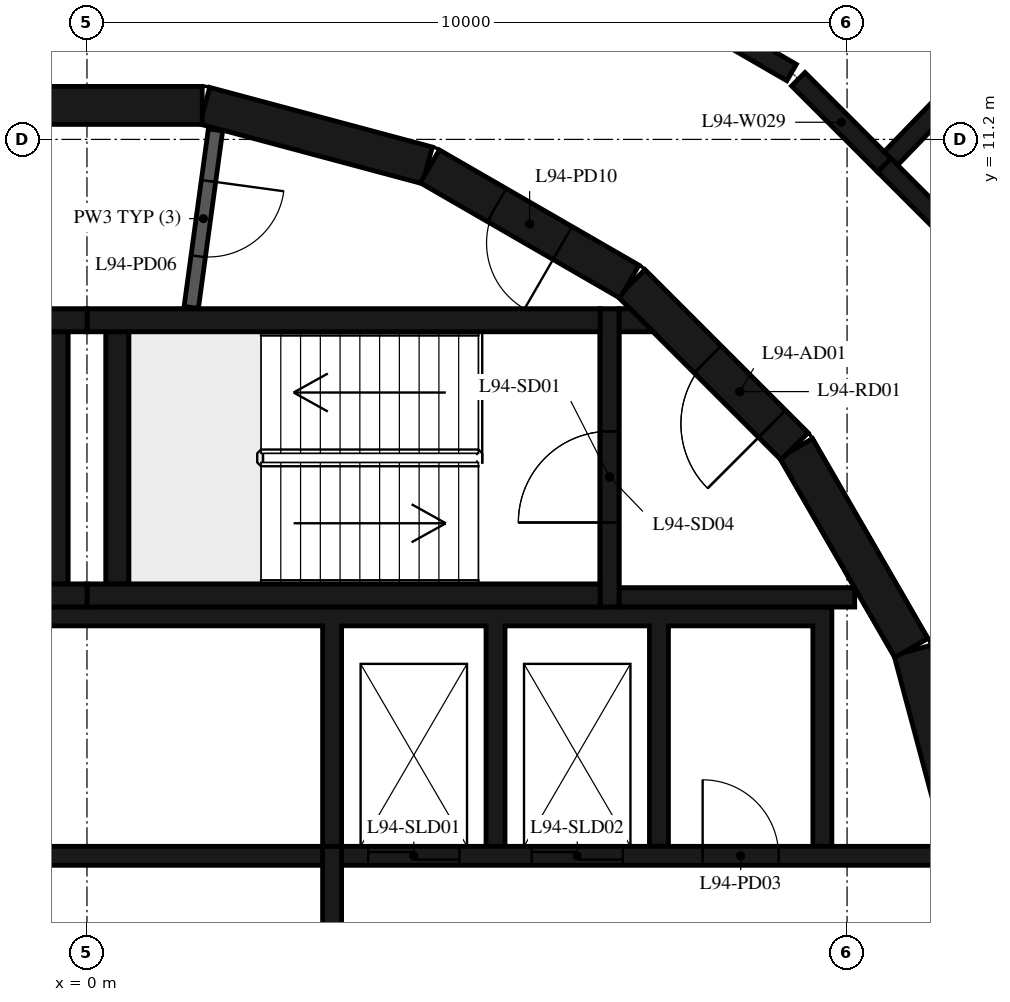
"""IFC4 building model, lengths in metres.
Left out: names, types, materials, properties, quantities, classifications, styles, units other than length and angle.
Written with IfcOpenShell. Run it as: python <this file> out.ifc"""

import sys

from ifc_helpers import new_model, si_unit, direction, frame, frame_2d, origin, place, context, subcontext, project, spatial, polyline, rectangle, outline, extrude, element, fill, save


model = new_model("IFC4")
c1 = context("Model", 3, precision=1e-05, world=origin(), true_north=direction((0.0, 1.0)))
c2 = subcontext(c1, "Body", "Model", "MODEL_VIEW")
j1 = project(units=[si_unit("LENGTHUNIT", "METRE"), si_unit("PLANEANGLEUNIT", "RADIAN")], contexts=[c1])
p1 = place(None, origin())
s1 = spatial("IfcSite", under=j1, at=p1, CompositionType="ELEMENT")
p2 = place(p1, origin())
s2 = spatial("IfcBuilding", under=s1, at=p2, CompositionType="ELEMENT")
p3 = place(p2, frame((0.0, 0.0, 366.2)))
s3 = spatial("IfcBuildingStorey", under=s2, at=p3, CompositionType="ELEMENT", Elevation=366.2)
for number, where, z_axis, x_axis in (
    (1, (11.643, 1.55, 0.0), (0.0, 0.0, 1.0), (-0.259, 0.966, 0.0)),
    (2, (10.845, 4.51, 0.0), (0.0, 0.0, 1.0), (-0.5, 0.866, 0.0)),
):
    element("IfcWall", number, at=place(p3, frame(where, z_axis=z_axis, x_axis=x_axis)), inside=s3, PredefinedType="SHEAR", context=c2, shape_type="SweptSolid", body=[
        extrude(rectangle(XDim=3.033, YDim=0.5, at=frame_2d((1.516, 0.0))), origin(), (0.0, 0.0, 1.0), 4.8),
    ])
p4 = place(p3, frame((9.308, 7.164, 0.0), z_axis=(0.0, 0.0, 1.0), x_axis=(-0.707106781187, 0.707106781187, 0.0)))
e3 = element("IfcWall", 3, at=p4, inside=s3, PredefinedType="SHEAR", context=c2, shape_type="SweptSolid", body=[
    extrude(rectangle(XDim=3.032, YDim=0.5, at=frame_2d((1.516, 0.0))), origin(), (0.0, 0.0, 1.0), 4.8),
])
p5 = place(p4, frame((0.416, 0.0, 0.0)))
e4 = element("IfcOpeningElement", 4, at=p5, cuts=e3, PredefinedType="OPENING", context=c2, shape_type="SweptSolid", body=[
    extrude(rectangle(XDim=1.2, YDim=2.1, at=frame_2d((0.6, 1.05))), frame((0.0, 0.26, 0.0), z_axis=(0.0, -1.0, 0.0), x_axis=(1.0, 0.0, 0.0)), (0.0, 0.0, 1.0), 0.52),
])
p6 = place(p3, frame((7.137, 9.329, 0.0), z_axis=(0.0, 0.0, 1.0), x_axis=(-0.865975092491, 0.500087131594, 0.0)))
e5 = element("IfcWall", 5, at=p6, inside=s3, PredefinedType="SHEAR", context=c2, shape_type="SweptSolid", body=[
    extrude(rectangle(XDim=3.033, YDim=0.5, at=frame_2d((1.516, 0.0))), origin(), (0.0, 0.0, 1.0), 4.8),
])
p7 = place(p6, frame((1.016, 0.0, 0.0)))
e6 = element("IfcOpeningElement", 6, at=p7, cuts=e5, PredefinedType="OPENING", context=c2, shape_type="SweptSolid", body=[
    extrude(rectangle(XDim=1.0, YDim=2.4, at=frame_2d((0.5, 1.2))), frame((0.0, 0.26, 0.0), z_axis=(0.0, -1.0, 0.0), x_axis=(1.0, 0.0, 0.0)), (0.0, 0.0, 1.0), 0.52),
])
for number, where, z_axis, x_axis in (
    (7, (4.479, 10.858, 0.0), (0.0, 0.0, 1.0), (-0.966, 0.259, 0.0)),
    (8, (1.516, 11.647, 0.0), (0.0, 0.0, 1.0), (-1.0, 0.0, 0.0)),
):
    element("IfcWall", number, at=place(p3, frame(where, z_axis=z_axis, x_axis=x_axis)), inside=s3, PredefinedType="SHEAR", context=c2, shape_type="SweptSolid", body=[
        extrude(rectangle(XDim=3.033, YDim=0.5, at=frame_2d((1.516, 0.0))), origin(), (0.0, 0.0, 1.0), 4.8),
    ])
for number, where, z_axis, x_axis in (
    (9, (0.0, 5.2, 0.0), (0.0, 0.0, 1.0), (1.0, 0.0, 0.0)),
    (10, (0.0, 8.82, 0.0), (0.0, 0.0, 1.0), (1.0, 0.0, 0.0)),
):
    element("IfcWall", number, at=place(p3, frame(where, z_axis=z_axis, x_axis=x_axis)), inside=s3, PredefinedType="SHEAR", context=c2, shape_type="SweptSolid", body=[
        extrude(rectangle(XDim=6.75, YDim=0.3, at=frame_2d((3.375, 0.0))), origin(), (0.0, 0.0, 1.0), 4.8),
    ])
p8 = place(p3, frame((0.4, 5.35, 0.0), z_axis=(0.0, 0.0, 1.0), x_axis=(0.0, 1.0, 0.0)))
e11 = element("IfcWall", 11, at=p8, inside=s3, PredefinedType="SHEAR", context=c2, shape_type="SweptSolid", body=[
    extrude(rectangle(XDim=3.32, YDim=0.3, at=frame_2d((1.66, 0.0))), origin(), (0.0, 0.0, 1.0), 4.8),
])
p9 = place(p3, frame((6.875, 5.05, 0.0), z_axis=(0.0, 0.0, 1.0), x_axis=(0.0, 1.0, 0.0)))
e12 = element("IfcWall", 12, at=p9, inside=s3, PredefinedType="SHEAR", context=c2, shape_type="SweptSolid", body=[
    extrude(rectangle(XDim=3.92, YDim=0.25, at=frame_2d((1.96, 0.0))), origin(), (0.0, 0.0, 1.0), 4.8),
])
p10 = place(p9, frame((1.11, 0.0, 0.0)))
e13 = element("IfcOpeningElement", 13, at=p10, cuts=e12, PredefinedType="OPENING", context=c2, shape_type="SweptSolid", body=[
    extrude(rectangle(XDim=1.2, YDim=2.1, at=frame_2d((0.6, 1.05))), frame((0.0, 0.135, 0.0), z_axis=(0.0, -1.0, 0.0), x_axis=(1.0, 0.0, 0.0)), (0.0, 0.0, 1.0), 0.27),
])
p11 = place(p3, frame((7.0, 5.175, 0.0), z_axis=(0.0, 0.0, 1.0), x_axis=(1.0, 0.0, 0.0)))
e14 = element("IfcWall", 14, at=p11, inside=s3, PredefinedType="SHEAR", context=c2, shape_type="SweptSolid", body=[
    extrude(rectangle(XDim=3.1, YDim=0.25, at=frame_2d((1.55, 0.0))), origin(), (0.0, 0.0, 1.0), 4.8),
])
p12 = place(p3, origin())
e15 = element("IfcWall", 15, at=p12, inside=s3, PredefinedType="SHEAR", context=c2, shape_type="SweptSolid", body=[
    extrude(outline(polyline([(7.448, 8.67), (7.0, 8.67), (7.0, 8.97), (7.148, 8.97), (7.448, 8.67)])), origin(), (0.0, 0.0, 1.0), 4.8),
])
for number, where, z_axis, x_axis in (
    (16, (-6.75, 5.2, 0.0), (0.0, 0.0, 1.0), (1.0, 0.0, 0.0)),
    (17, (-6.75, 8.82, 0.0), (0.0, 0.0, 1.0), (1.0, 0.0, 0.0)),
):
    element("IfcWall", number, at=place(p3, frame(where, z_axis=z_axis, x_axis=x_axis)), inside=s3, PredefinedType="SHEAR", context=c2, shape_type="SweptSolid", body=[
        extrude(rectangle(XDim=6.75, YDim=0.3, at=frame_2d((3.375, 0.0))), origin(), (0.0, 0.0, 1.0), 4.8),
    ])
p13 = place(p3, frame((-0.4, 5.35, 0.0), z_axis=(0.0, 0.0, 1.0), x_axis=(0.0, 1.0, 0.0)))
e18 = element("IfcWall", 18, at=p13, inside=s3, PredefinedType="SHEAR", context=c2, shape_type="SweptSolid", body=[
    extrude(rectangle(XDim=3.32, YDim=0.3, at=frame_2d((1.66, 0.0))), origin(), (0.0, 0.0, 1.0), 4.8),
])
p14 = place(p3, origin())
e19 = element("IfcWall", 19, at=p14, inside=s3, PredefinedType="SHEAR", context=c2, shape_type="SweptSolid", body=[
    extrude(outline(polyline([(-9.8, 1.9), (-9.55, 1.9), (-9.55, 4.8), (-5.5, 4.8), (-5.5, 1.9), (-5.25, 1.9), (-5.25, 4.8), (3.1, 4.8), (3.1, 1.9), (3.35, 1.9), (3.35, 4.8), (5.25, 4.8), (5.25, 1.9), (5.5, 1.9), (5.5, 4.8), (7.4, 4.8), (7.4, 1.9), (7.65, 1.9), (7.65, 4.8), (9.55, 4.8), (9.55, 1.9), (9.8, 1.9), (9.8, 4.8), (9.8, 5.05), (-9.8, 5.05), (-9.8, 4.8), (-9.8, 1.9)])), origin(), (0.0, 0.0, 1.0), 4.8),
])
p15 = place(p3, frame((-11.28, 1.775, 0.0), z_axis=(0.0, 0.0, 1.0), x_axis=(1.0, 0.0, 0.0)))
e20 = element("IfcWall", 20, at=p15, inside=s3, PredefinedType="SHEAR", context=c2, shape_type="SweptSolid", body=[
    extrude(rectangle(XDim=14.38, YDim=0.25, at=frame_2d((7.19, 0.0))), origin(), (0.0, 0.0, 1.0), 4.8),
])
p16 = place(p15, frame((3.255, 0.0, 0.0)))
e21 = element("IfcOpeningElement", 21, at=p16, cuts=e20, PredefinedType="OPENING", context=c2, shape_type="SweptSolid", body=[
    extrude(rectangle(XDim=1.0, YDim=2.4, at=frame_2d((0.5, 1.2))), frame((0.0, 0.135, 0.0), z_axis=(0.0, -1.0, 0.0), x_axis=(1.0, 0.0, 0.0)), (0.0, 0.0, 1.0), 0.27),
])
p17 = place(p15, frame((9.705, 0.0, 0.0)))
e22 = element("IfcOpeningElement", 22, at=p17, cuts=e20, PredefinedType="OPENING", context=c2, shape_type="SweptSolid", body=[
    extrude(rectangle(XDim=1.0, YDim=2.4, at=frame_2d((0.5, 1.2))), frame((0.0, 0.135, 0.0), z_axis=(0.0, -1.0, 0.0), x_axis=(1.0, 0.0, 0.0)), (0.0, 0.0, 1.0), 0.27),
])
p18 = place(p3, frame((3.35, 1.775, 0.0), z_axis=(0.0, 0.0, 1.0), x_axis=(1.0, 0.0, 0.0)))
e23 = element("IfcWall", 23, at=p18, inside=s3, PredefinedType="SHEAR", context=c2, shape_type="SweptSolid", body=[
    extrude(rectangle(XDim=7.93, YDim=0.25, at=frame_2d((3.965, 0.0))), origin(), (0.0, 0.0, 1.0), 4.8),
])
p19 = place(p18, frame((0.35, 0.0, 0.0)))
e24 = element("IfcOpeningElement", 24, at=p19, cuts=e23, PredefinedType="OPENING", context=c2, shape_type="SweptSolid", body=[
    extrude(rectangle(XDim=1.2, YDim=2.4, at=frame_2d((0.6, 1.2))), frame((0.0, 0.135, 0.0), z_axis=(0.0, -1.0, 0.0), x_axis=(1.0, 0.0, 0.0)), (0.0, 0.0, 1.0), 0.27),
])
p20 = place(p18, frame((2.5, 0.0, 0.0)))
e25 = element("IfcOpeningElement", 25, at=p20, cuts=e23, PredefinedType="OPENING", context=c2, shape_type="SweptSolid", body=[
    extrude(rectangle(XDim=1.2, YDim=2.4, at=frame_2d((0.6, 1.2))), frame((0.0, 0.135, 0.0), z_axis=(0.0, -1.0, 0.0), x_axis=(1.0, 0.0, 0.0)), (0.0, 0.0, 1.0), 0.27),
])
p21 = place(p18, frame((4.75, 0.0, 0.0)))
e26 = element("IfcOpeningElement", 26, at=p21, cuts=e23, PredefinedType="OPENING", context=c2, shape_type="SweptSolid", body=[
    extrude(rectangle(XDim=1.0, YDim=2.4, at=frame_2d((0.5, 1.2))), frame((0.0, 0.135, 0.0), z_axis=(0.0, -1.0, 0.0), x_axis=(1.0, 0.0, 0.0)), (0.0, 0.0, 1.0), 0.27),
])
p22 = place(p3, frame((3.225, -1.9, 0.0), z_axis=(0.0, 0.0, 1.0), x_axis=(0.0, 1.0, 0.0)))
e27 = element("IfcWall", 27, at=p22, inside=s3, PredefinedType="SHEAR", context=c2, shape_type="SweptSolid", body=[
    extrude(rectangle(XDim=3.8, YDim=0.25, at=frame_2d((1.9, 0.0))), origin(), (0.0, 0.0, 1.0), 4.8),
])
p23 = place(p3, frame((1.691, 11.326, 0.0), z_axis=(0.0, 0.0, 1.0), x_axis=(-0.135344253201, -0.990798633994, 0.0)))
e28 = element("IfcWall", 28, at=p23, inside=s3, PredefinedType="PARTITIONING", context=c2, shape_type="SweptSolid", body=[
    extrude(rectangle(XDim=2.358, YDim=0.19, at=frame_2d((1.179, 0.0))), origin(), (0.0, 0.0, 1.0), 4.8),
])
p24 = place(p23, frame((0.679, 0.0, 0.0)))
e29 = element("IfcOpeningElement", 29, at=p24, cuts=e28, PredefinedType="OPENING", context=c2, shape_type="SweptSolid", body=[
    extrude(rectangle(XDim=1.0, YDim=2.4, at=frame_2d((0.5, 1.2))), frame((0.0, 0.105, 0.0), z_axis=(0.0, -1.0, 0.0), x_axis=(1.0, 0.0, 0.0)), (0.0, 0.0, 1.0), 0.21),
])
for number, where, z_axis, x_axis in (
    (30, (0.0, 5.2, 5.2), (0.0, 0.0, 1.0), (1.0, 0.0, 0.0)),
    (31, (0.0, 8.82, 5.2), (0.0, 0.0, 1.0), (1.0, 0.0, 0.0)),
):
    element("IfcWall", number, at=place(p3, frame(where, z_axis=z_axis, x_axis=x_axis)), inside=s3, PredefinedType="SHEAR", context=c2, shape_type="SweptSolid", body=[
        extrude(rectangle(XDim=6.75, YDim=0.3, at=frame_2d((3.375, 0.0))), origin(), (0.0, 0.0, 1.0), 2.8),
    ])
p25 = place(p3, frame((0.4, 5.35, 5.2), z_axis=(0.0, 0.0, 1.0), x_axis=(0.0, 1.0, 0.0)))
e32 = element("IfcWall", 32, at=p25, inside=s3, PredefinedType="SHEAR", context=c2, shape_type="SweptSolid", body=[
    extrude(rectangle(XDim=3.32, YDim=0.3, at=frame_2d((1.66, 0.0))), origin(), (0.0, 0.0, 1.0), 2.8),
])
p26 = place(p3, frame((6.875, 5.05, 5.2), z_axis=(0.0, 0.0, 1.0), x_axis=(0.0, 1.0, 0.0)))
e33 = element("IfcWall", 33, at=p26, inside=s3, PredefinedType="SHEAR", context=c2, shape_type="SweptSolid", body=[
    extrude(rectangle(XDim=3.92, YDim=0.25, at=frame_2d((1.96, 0.0))), origin(), (0.0, 0.0, 1.0), 2.8),
])
p27 = place(p26, frame((1.11, 0.0, 0.0)))
e34 = element("IfcOpeningElement", 34, at=p27, cuts=e33, PredefinedType="OPENING", context=c2, shape_type="SweptSolid", body=[
    extrude(rectangle(XDim=1.2, YDim=2.1, at=frame_2d((0.6, 1.05))), frame((0.0, 0.135, 0.0), z_axis=(0.0, -1.0, 0.0), x_axis=(1.0, 0.0, 0.0)), (0.0, 0.0, 1.0), 0.27),
])
p28 = place(p3, frame((7.0, 5.175, 5.2), z_axis=(0.0, 0.0, 1.0), x_axis=(1.0, 0.0, 0.0)))
e35 = element("IfcWall", 35, at=p28, inside=s3, PredefinedType="SHEAR", context=c2, shape_type="SweptSolid", body=[
    extrude(rectangle(XDim=3.1, YDim=0.25, at=frame_2d((1.55, 0.0))), origin(), (0.0, 0.0, 1.0), 2.8),
])
p29 = place(p3, frame((0.0, 0.0, 5.2)))
e36 = element("IfcWall", 36, at=p29, inside=s3, PredefinedType="SHEAR", context=c2, shape_type="SweptSolid", body=[
    extrude(outline(polyline([(7.448, 8.67), (7.0, 8.67), (7.0, 8.97), (7.148, 8.97), (7.448, 8.67)])), origin(), (0.0, 0.0, 1.0), 2.8),
])
p30 = place(p3, frame((10.845, 4.51, 5.2), z_axis=(0.0, 0.0, 1.0), x_axis=(-0.500087131594, 0.865975092491, 0.0)))
e37 = element("IfcWall", 37, at=p30, inside=s3, PredefinedType="SHEAR", context=c2, shape_type="SweptSolid", body=[
    extrude(rectangle(XDim=3.033, YDim=0.5, at=frame_2d((1.516, 0.0))), origin(), (0.0, 0.0, 1.0), 2.8),
])
p31 = place(p3, frame((9.308, 7.164, 5.2), z_axis=(0.0, 0.0, 1.0), x_axis=(-0.707106781187, 0.707106781187, 0.0)))
e38 = element("IfcWall", 38, at=p31, inside=s3, PredefinedType="SHEAR", context=c2, shape_type="SweptSolid", body=[
    extrude(rectangle(XDim=3.032, YDim=0.5, at=frame_2d((1.516, 0.0))), origin(), (0.0, 0.0, 1.0), 2.8),
])
p32 = place(p31, frame((0.416, 0.0, 0.0)))
e39 = element("IfcOpeningElement", 39, at=p32, cuts=e38, PredefinedType="OPENING", context=c2, shape_type="SweptSolid", body=[
    extrude(rectangle(XDim=1.2, YDim=2.1, at=frame_2d((0.6, 1.05))), frame((0.0, 0.26, 0.0), z_axis=(0.0, -1.0, 0.0), x_axis=(1.0, 0.0, 0.0)), (0.0, 0.0, 1.0), 0.52),
])
for number, where, z_axis, x_axis in (
    (40, (-6.75, 5.2, 5.2), (0.0, 0.0, 1.0), (1.0, 0.0, 0.0)),
    (41, (-6.75, 8.82, 5.2), (0.0, 0.0, 1.0), (1.0, 0.0, 0.0)),
):
    element("IfcWall", number, at=place(p3, frame(where, z_axis=z_axis, x_axis=x_axis)), inside=s3, PredefinedType="SHEAR", context=c2, shape_type="SweptSolid", body=[
        extrude(rectangle(XDim=6.75, YDim=0.3, at=frame_2d((3.375, 0.0))), origin(), (0.0, 0.0, 1.0), 2.8),
    ])
p33 = place(p3, frame((-0.4, 5.35, 5.2), z_axis=(0.0, 0.0, 1.0), x_axis=(0.0, 1.0, 0.0)))
e42 = element("IfcWall", 42, at=p33, inside=s3, PredefinedType="SHEAR", context=c2, shape_type="SweptSolid", body=[
    extrude(rectangle(XDim=3.32, YDim=0.3, at=frame_2d((1.66, 0.0))), origin(), (0.0, 0.0, 1.0), 2.8),
])
p34 = place(p3, frame((9.27, 12.08, 0.0), z_axis=(0.0, 0.0, 1.0), x_axis=(-0.865615852585, 0.500708693508, 0.0)))
e43 = element("IfcWall", 43, at=p34, inside=s3, PredefinedType="PARTITIONING", context=c2, shape_type="SweptSolid", body=[
    extrude(rectangle(XDim=3.849, YDim=0.25, at=frame_2d((1.925, 0.0))), origin(), (0.0, 0.0, 1.0), 4.8),
])
p35 = place(p3, frame((10.49, 10.86, 0.0), z_axis=(0.0, 0.0, 1.0), x_axis=(-0.707106781187, 0.707106781187, 0.0)))
e44 = element("IfcWall", 44, at=p35, inside=s3, PredefinedType="PARTITIONING", context=c2, shape_type="SweptSolid", body=[
    extrude(rectangle(XDim=1.6, YDim=0.25, at=frame_2d((0.8, 0.0))), origin(), (0.0, 0.0, 1.0), 4.8),
])
p36 = place(p3, frame((10.577, 10.95, 0.0), z_axis=(0.0, 0.0, 1.0), x_axis=(0.694748067219, 0.719253170376, 0.0)))
e45 = element("IfcWall", 45, at=p36, inside=s3, PredefinedType="PARTITIONING", context=c2, shape_type="SweptSolid", body=[
    extrude(rectangle(XDim=5.589, YDim=0.25, at=frame_2d((2.794, 0.0))), origin(), (0.0, 0.0, 1.0), 4.8),
])
p37 = place(p3, frame((12.08, 9.27, 0.0), z_axis=(0.0, 0.0, 1.0), x_axis=(-0.707106781187, 0.707106781187, 0.0)))
e46 = element("IfcWall", 46, at=p37, inside=s3, PredefinedType="PARTITIONING", context=c2, shape_type="SweptSolid", body=[
    extrude(rectangle(XDim=2.249, YDim=0.25, at=frame_2d((1.125, 0.0))), origin(), (0.0, 0.0, 1.0), 4.8),
])
p38 = place(p10, origin())
e47 = element("IfcDoor", 47, at=p38, inside=s3, OperationType="SINGLE_SWING_LEFT", PredefinedType="DOOR", context=c2, shape_type="SweptSolid", body=[
    extrude(rectangle(XDim=1.2, YDim=2.1, at=frame_2d((0.6, 1.05))), frame((0.0, 0.025, 0.0), z_axis=(0.0, -1.0, 0.0), x_axis=(1.0, 0.0, 0.0)), (0.0, 0.0, 1.0), 0.05),
])
fill(e13, e47)
p39 = place(p5, origin())
e48 = element("IfcDoor", 48, at=p39, inside=s3, OperationType="SINGLE_SWING_RIGHT", PredefinedType="DOOR", context=c2, shape_type="SweptSolid", body=[
    extrude(rectangle(XDim=1.2, YDim=2.1, at=frame_2d((0.6, 1.05))), frame((0.0, 0.025, 0.0), z_axis=(0.0, -1.0, 0.0), x_axis=(1.0, 0.0, 0.0)), (0.0, 0.0, 1.0), 0.05),
])
fill(e4, e48)
p40 = place(p19, origin())
e49 = element("IfcDoor", 49, at=p40, inside=s3, OperationType="DOUBLE_DOOR_SLIDING", PredefinedType="DOOR", context=c2, shape_type="SweptSolid", body=[
    extrude(rectangle(XDim=1.2, YDim=2.4, at=frame_2d((0.6, 1.2))), frame((0.0, 0.025, 0.0), z_axis=(0.0, -1.0, 0.0), x_axis=(1.0, 0.0, 0.0)), (0.0, 0.0, 1.0), 0.05),
])
fill(e24, e49)
p41 = place(p20, origin())
e50 = element("IfcDoor", 50, at=p41, inside=s3, OperationType="DOUBLE_DOOR_SLIDING", PredefinedType="DOOR", context=c2, shape_type="SweptSolid", body=[
    extrude(rectangle(XDim=1.2, YDim=2.4, at=frame_2d((0.6, 1.2))), frame((0.0, 0.025, 0.0), z_axis=(0.0, -1.0, 0.0), x_axis=(1.0, 0.0, 0.0)), (0.0, 0.0, 1.0), 0.05),
])
fill(e25, e50)
p42 = place(p21, origin())
e51 = element("IfcDoor", 51, at=p42, inside=s3, OperationType="SINGLE_SWING_RIGHT", PredefinedType="DOOR", context=c2, shape_type="SweptSolid", body=[
    extrude(rectangle(XDim=1.0, YDim=2.4, at=frame_2d((0.5, 1.2))), frame((0.0, 0.025, 0.0), z_axis=(0.0, -1.0, 0.0), x_axis=(1.0, 0.0, 0.0)), (0.0, 0.0, 1.0), 0.05),
])
fill(e26, e51)
p43 = place(p24, origin())
e52 = element("IfcDoor", 52, at=p43, inside=s3, OperationType="SINGLE_SWING_LEFT", PredefinedType="DOOR", context=c2, shape_type="SweptSolid", body=[
    extrude(rectangle(XDim=1.0, YDim=2.4, at=frame_2d((0.5, 1.2))), frame((0.0, 0.025, 0.0), z_axis=(0.0, -1.0, 0.0), x_axis=(1.0, 0.0, 0.0)), (0.0, 0.0, 1.0), 0.05),
])
fill(e29, e52)
p44 = place(p7, origin())
e53 = element("IfcDoor", 53, at=p44, inside=s3, OperationType="SINGLE_SWING_LEFT", PredefinedType="DOOR", context=c2, shape_type="SweptSolid", body=[
    extrude(rectangle(XDim=1.0, YDim=2.4, at=frame_2d((0.5, 1.2))), frame((0.0, 0.025, 0.0), z_axis=(0.0, -1.0, 0.0), x_axis=(1.0, 0.0, 0.0)), (0.0, 0.0, 1.0), 0.05),
])
fill(e6, e53)
p45 = place(p27, origin())
e54 = element("IfcDoor", 54, at=p45, inside=s3, OperationType="SINGLE_SWING_RIGHT", PredefinedType="DOOR", context=c2, shape_type="SweptSolid", body=[
    extrude(rectangle(XDim=1.2, YDim=2.1, at=frame_2d((0.6, 1.05))), frame((0.0, 0.025, 0.0), z_axis=(0.0, -1.0, 0.0), x_axis=(1.0, 0.0, 0.0)), (0.0, 0.0, 1.0), 0.05),
])
fill(e34, e54)
p46 = place(p32, origin())
e55 = element("IfcDoor", 55, at=p46, inside=s3, OperationType="SINGLE_SWING_LEFT", PredefinedType="DOOR", context=c2, shape_type="SweptSolid", body=[
    extrude(rectangle(XDim=1.2, YDim=2.1, at=frame_2d((0.6, 1.05))), frame((0.0, 0.025, 0.0), z_axis=(0.0, -1.0, 0.0), x_axis=(1.0, 0.0, 0.0)), (0.0, 0.0, 1.0), 0.05),
])
fill(e39, e55)
save(model, sys.argv[1])
